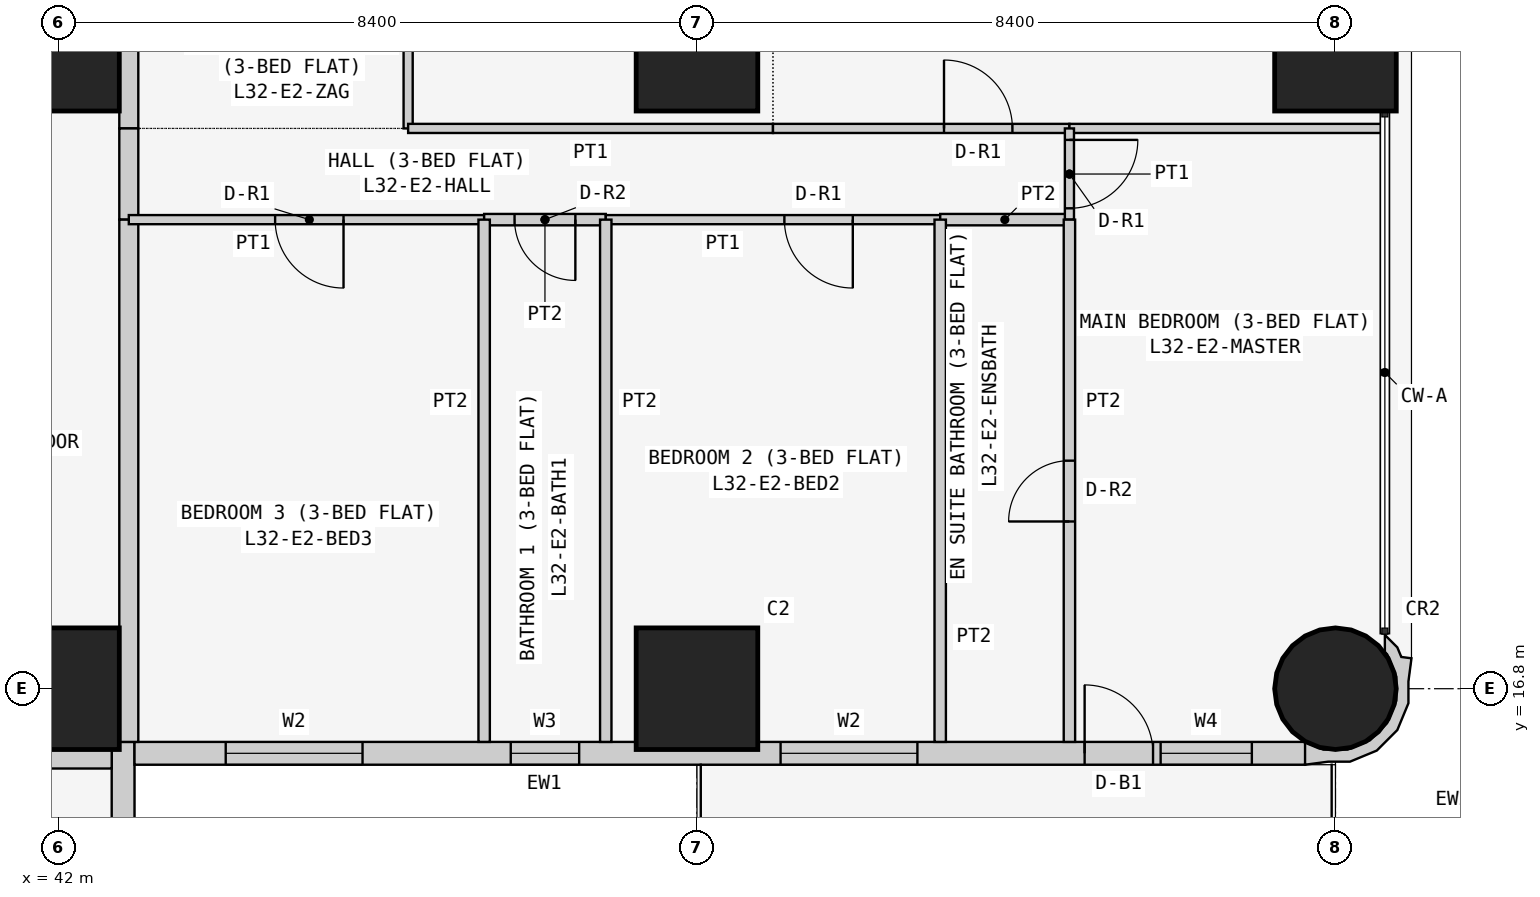
"""IFC4 building model, lengths in metres.
Left out: names, types, materials, properties, quantities, classifications, styles, units other than length and angle.
Written with IfcOpenShell. Run it as: python <this file> out.ifc"""

import sys

from ifc_helpers import new_model, si_unit, direction, frame, frame_2d, origin, origin_2d, place, context, subcontext, project, spatial, polyline, rectangle, circle, outline, extrude, element, fill, save


model = new_model("IFC4")
c1 = context("Model", 3, precision=1e-05, world=origin(), true_north=direction((0.0, 1.0)))
c2 = subcontext(c1, "Body", "Model", "MODEL_VIEW")
j1 = project(units=[si_unit("LENGTHUNIT", "METRE"), si_unit("PLANEANGLEUNIT", "RADIAN")], contexts=[c1])
p1 = place(None, origin())
s1 = spatial("IfcSite", under=j1, at=p1, CompositionType="ELEMENT")
p2 = place(p1, origin())
s2 = spatial("IfcBuilding", under=s1, at=p2, CompositionType="ELEMENT")
p3 = place(p2, frame((0.0, 0.0, 126.9)))
s3 = spatial("IfcBuildingStorey", under=s2, at=p3, CompositionType="ELEMENT", Elevation=126.9)
for number, where, z_axis, x_axis in (
    (1, (42.0, 16.8, 0.0), (0.0, 0.0, 1.0), (1.0, 0.0, 0.0)),
    (2, (42.0, 25.2, 0.0), (0.0, 0.0, 1.0), (1.0, 0.0, 0.0)),
    (3, (50.4, 16.8, 0.0), (0.0, 0.0, 1.0), (1.0, 0.0, 0.0)),
    (4, (50.4, 25.2, 0.0), (0.0, 0.0, 1.0), (1.0, 0.0, 0.0)),
):
    element("IfcColumn", number, at=place(p3, frame(where, z_axis=z_axis, x_axis=x_axis)), inside=s3, PredefinedType="COLUMN", context=c2, shape_type="SweptSolid", body=[
        extrude(rectangle(XDim=1.6, YDim=1.6, at=origin_2d()), origin(), (0.0, 0.0, 1.0), 3.6),
    ])
p4 = place(p3, frame((58.8, 16.8, 0.0), z_axis=(0.0, 0.0, 1.0), x_axis=(1.0, 0.0, 0.0)))
e5 = element("IfcColumn", 5, at=p4, inside=s3, PredefinedType="COLUMN", context=c2, shape_type="SweptSolid", body=[
    extrude(circle(Radius=0.8, at=origin_2d()), origin(), (0.0, 0.0, 1.0), 3.6),
])
p5 = place(p3, frame((58.8, 25.2, 0.0), z_axis=(0.0, 0.0, 1.0), x_axis=(1.0, 0.0, 0.0)))
e6 = element("IfcColumn", 6, at=p5, inside=s3, PredefinedType="COLUMN", context=c2, shape_type="SweptSolid", body=[
    extrude(rectangle(XDim=1.6, YDim=1.6, at=origin_2d()), origin(), (0.0, 0.0, 1.0), 3.6),
])
p6 = place(p3, frame((42.85, 8.8, 0.0), z_axis=(0.0, 0.0, 1.0), x_axis=(0.0, 1.0, 0.0)))
e7 = element("IfcWall", 7, at=p6, inside=s3, PredefinedType="SOLIDWALL", context=c2, shape_type="SweptSolid", body=[
    extrude(rectangle(XDim=7.3, YDim=0.3, at=frame_2d((3.65, 0.0))), origin(), (0.0, 0.0, 1.0), 3.45),
])
p7 = place(p6, frame((3.1, 0.0, 0.9)))
e8 = element("IfcOpeningElement", 8, at=p7, cuts=e7, PredefinedType="OPENING", context=c2, shape_type="SweptSolid", body=[
    extrude(rectangle(XDim=2.4, YDim=1.5, at=frame_2d((1.2, 0.75))), frame((0.0, 0.16, 0.0), z_axis=(0.0, -1.0, 0.0), x_axis=(1.0, 0.0, 0.0)), (0.0, 0.0, 1.0), 0.32),
])
p8 = place(p6, frame((0.75, 0.0, 0.9)))
e9 = element("IfcOpeningElement", 9, at=p8, cuts=e7, PredefinedType="OPENING", context=c2, shape_type="SweptSolid", body=[
    extrude(rectangle(XDim=1.2, YDim=1.5, at=frame_2d((0.6, 0.75))), frame((0.0, 0.16, 0.0), z_axis=(0.0, -1.0, 0.0), x_axis=(1.0, 0.0, 0.0)), (0.0, 0.0, 1.0), 0.32),
])
p9 = place(p3, frame((43.0, 15.95, 0.0), z_axis=(0.0, 0.0, 1.0), x_axis=(1.0, 0.0, 0.0)))
e10 = element("IfcWall", 10, at=p9, inside=s3, PredefinedType="SOLIDWALL", context=c2, shape_type="SweptSolid", body=[
    extrude(rectangle(XDim=15.4, YDim=0.3, at=frame_2d((7.7, 0.0))), origin(), (0.0, 0.0, 1.0), 3.45),
])
p10 = place(p9, frame((1.2, 0.0, 0.9)))
e11 = element("IfcOpeningElement", 11, at=p10, cuts=e10, PredefinedType="OPENING", context=c2, shape_type="SweptSolid", body=[
    extrude(rectangle(XDim=1.8, YDim=1.5, at=frame_2d((0.9, 0.75))), frame((0.0, 0.16, 0.0), z_axis=(0.0, -1.0, 0.0), x_axis=(1.0, 0.0, 0.0)), (0.0, 0.0, 1.0), 0.32),
])
p11 = place(p9, frame((4.95, 0.0, 1.5)))
e12 = element("IfcOpeningElement", 12, at=p11, cuts=e10, PredefinedType="OPENING", context=c2, shape_type="SweptSolid", body=[
    extrude(rectangle(XDim=0.9, YDim=0.7, at=frame_2d((0.45, 0.35))), frame((0.0, 0.16, 0.0), z_axis=(0.0, -1.0, 0.0), x_axis=(1.0, 0.0, 0.0)), (0.0, 0.0, 1.0), 0.32),
])
p12 = place(p9, frame((8.5, 0.0, 0.9)))
e13 = element("IfcOpeningElement", 13, at=p12, cuts=e10, PredefinedType="OPENING", context=c2, shape_type="SweptSolid", body=[
    extrude(rectangle(XDim=1.8, YDim=1.5, at=frame_2d((0.9, 0.75))), frame((0.0, 0.16, 0.0), z_axis=(0.0, -1.0, 0.0), x_axis=(1.0, 0.0, 0.0)), (0.0, 0.0, 1.0), 0.32),
])
p13 = place(p9, frame((12.5, 0.0, 0.0)))
e14 = element("IfcOpeningElement", 14, at=p13, cuts=e10, PredefinedType="OPENING", context=c2, shape_type="SweptSolid", body=[
    extrude(rectangle(XDim=0.9, YDim=2.4, at=frame_2d((0.45, 1.2))), frame((0.0, 0.16, 0.0), z_axis=(0.0, -1.0, 0.0), x_axis=(1.0, 0.0, 0.0)), (0.0, 0.0, 1.0), 0.32),
])
p14 = place(p9, frame((13.5, 0.0, 0.9)))
e15 = element("IfcOpeningElement", 15, at=p14, cuts=e10, PredefinedType="OPENING", context=c2, shape_type="SweptSolid", body=[
    extrude(rectangle(XDim=1.2, YDim=1.5, at=frame_2d((0.6, 0.75))), frame((0.0, 0.16, 0.0), z_axis=(0.0, -1.0, 0.0), x_axis=(1.0, 0.0, 0.0)), (0.0, 0.0, 1.0), 0.32),
])
p15 = place(p3, frame((58.473, 15.983, 0.0), z_axis=(0.0, 0.0, 1.0), x_axis=(0.93923434088, -0.343276641956, 0.0)))
e16 = element("IfcWall", 16, at=p15, inside=s3, PredefinedType="SOLIDWALL", context=c2, shape_type="SweptSolid", body=[
    extrude(outline(polyline([(0.828, 1.599), (0.697, 1.569), (0.604, 1.67), (0.394, 1.767), (0.471, 1.556), (0.508, 1.539), (0.724, 1.304), (0.834, 1.005), (0.82, 0.686), (0.686, 0.397), (0.451, 0.182), (0.152, 0.073), (-0.116, 0.084), (-0.127, 0.078), (-0.146, 0.071), (-0.006, -0.197), (0.266, -0.055), (0.535, 0.044), (0.817, 0.302), (0.978, 0.648), (0.994, 1.03), (0.895, 1.3), (0.828, 1.599)])), origin(), (0.0, 0.0, 1.0), 3.45),
])
p16 = place(p3, frame((42.925, 29.4, 0.0), z_axis=(0.0, 0.0, 1.0), x_axis=(0.0, -1.0, 0.0)))
e17 = element("IfcWall", 17, at=p16, inside=s3, PredefinedType="PARTITIONING", context=c2, shape_type="SweptSolid", body=[
    extrude(rectangle(XDim=5.229, YDim=0.25, at=frame_2d((2.615, 0.0))), origin(), (0.0, 0.0, 1.0), 3.45),
])
p17 = place(p16, frame((2.1, 0.0, 0.0)))
e18 = element("IfcOpeningElement", 18, at=p17, cuts=e17, PredefinedType="OPENING", context=c2, shape_type="SweptSolid", body=[
    extrude(rectangle(XDim=1.0, YDim=2.1, at=frame_2d((0.5, 1.05))), frame((0.0, 0.135, 0.0), z_axis=(0.0, -1.0, 0.0), x_axis=(1.0, 0.0, 0.0)), (0.0, 0.0, 1.0), 0.27),
])
p18 = place(p3, frame((42.925, 24.171, 0.0), z_axis=(0.0, 0.0, 1.0), x_axis=(0.0, -1.0, 0.0)))
e19 = element("IfcWall", 19, at=p18, inside=s3, PredefinedType="PARTITIONING", context=c2, shape_type="SweptSolid", body=[
    extrude(rectangle(XDim=1.2, YDim=0.25, at=frame_2d((0.6, 0.0))), origin(), (0.0, 0.0, 1.0), 3.45),
])
for number, where, z_axis, x_axis in (
    (20, (42.925, 22.971, 0.0), (0.0, 0.0, 1.0), (0.0, -1.0, 0.0)),
    (21, (42.7, 15.875, 0.0), (0.0, 0.0, 1.0), (-1.0, 0.0, 0.0)),
):
    element("IfcWall", number, at=place(p3, frame(where, z_axis=z_axis, x_axis=x_axis)), inside=s3, PredefinedType="PARTITIONING", context=c2, shape_type="SweptSolid", body=[
        extrude(rectangle(XDim=6.871, YDim=0.25, at=frame_2d((3.436, 0.0))), origin(), (0.0, 0.0, 1.0), 3.45),
    ])
p19 = place(p3, frame((46.6, 29.4, 0.0), z_axis=(0.0, 0.0, 1.0), x_axis=(0.0, -1.0, 0.0)))
e22 = element("IfcWall", 22, at=p19, inside=s3, PredefinedType="PARTITIONING", context=c2, shape_type="SweptSolid", body=[
    extrude(rectangle(XDim=5.229, YDim=0.12, at=frame_2d((2.615, 0.0))), origin(), (0.0, 0.0, 1.0), 3.45),
])
p20 = place(p19, frame((1.05, 0.0, 0.0)))
e23 = element("IfcOpeningElement", 23, at=p20, cuts=e22, PredefinedType="OPENING", context=c2, shape_type="SweptSolid", body=[
    extrude(rectangle(XDim=0.9, YDim=2.1, at=frame_2d((0.45, 1.05))), frame((0.0, 0.07, 0.0), z_axis=(0.0, -1.0, 0.0), x_axis=(1.0, 0.0, 0.0)), (0.0, 0.0, 1.0), 0.14),
])
p21 = place(p3, frame((51.4, 24.171, 0.0), z_axis=(0.0, 0.0, 1.0), x_axis=(-1.0, 0.0, 0.0)))
e24 = element("IfcWall", 24, at=p21, inside=s3, PredefinedType="PARTITIONING", context=c2, shape_type="SweptSolid", body=[
    extrude(rectangle(XDim=4.8, YDim=0.12, at=frame_2d((2.4, 0.0))), origin(), (0.0, 0.0, 1.0), 3.45),
])
p22 = place(p3, frame((55.3, 24.171, 0.0), z_axis=(0.0, 0.0, 1.0), x_axis=(-1.0, 0.0, 0.0)))
e25 = element("IfcWall", 25, at=p22, inside=s3, PredefinedType="PARTITIONING", context=c2, shape_type="SweptSolid", body=[
    extrude(rectangle(XDim=3.9, YDim=0.12, at=frame_2d((1.95, 0.0))), origin(), (0.0, 0.0, 1.0), 3.45),
])
p23 = place(p22, frame((0.75, 0.0, 0.0)))
e26 = element("IfcOpeningElement", 26, at=p23, cuts=e25, PredefinedType="OPENING", context=c2, shape_type="SweptSolid", body=[
    extrude(rectangle(XDim=0.9, YDim=2.1, at=frame_2d((0.45, 1.05))), frame((0.0, 0.07, 0.0), z_axis=(0.0, -1.0, 0.0), x_axis=(1.0, 0.0, 0.0)), (0.0, 0.0, 1.0), 0.14),
])
p24 = place(p3, frame((59.45, 24.171, 0.0), z_axis=(0.0, 0.0, 1.0), x_axis=(-1.0, 0.0, 0.0)))
e27 = element("IfcWall", 27, at=p24, inside=s3, PredefinedType="PARTITIONING", context=c2, shape_type="SweptSolid", body=[
    extrude(rectangle(XDim=4.15, YDim=0.12, at=frame_2d((2.075, 0.0))), origin(), (0.0, 0.0, 1.0), 3.45),
])
p25 = place(p3, frame((47.6, 22.971, 0.0), z_axis=(0.0, 0.0, 1.0), x_axis=(-1.0, 0.0, 0.0)))
e28 = element("IfcWall", 28, at=p25, inside=s3, PredefinedType="PARTITIONING", context=c2, shape_type="SweptSolid", body=[
    extrude(rectangle(XDim=4.675, YDim=0.12, at=frame_2d((2.337, 0.0))), origin(), (0.0, 0.0, 1.0), 3.45),
])
p26 = place(p25, frame((1.85, 0.0, 0.0)))
e29 = element("IfcOpeningElement", 29, at=p26, cuts=e28, PredefinedType="OPENING", context=c2, shape_type="SweptSolid", body=[
    extrude(rectangle(XDim=0.9, YDim=2.1, at=frame_2d((0.45, 1.05))), frame((0.0, 0.07, 0.0), z_axis=(0.0, -1.0, 0.0), x_axis=(1.0, 0.0, 0.0)), (0.0, 0.0, 1.0), 0.14),
])
p27 = place(p3, frame((49.2, 22.971, 0.0), z_axis=(0.0, 0.0, 1.0), x_axis=(-1.0, 0.0, 0.0)))
e30 = element("IfcWall", 30, at=p27, inside=s3, PredefinedType="PARTITIONING", context=c2, shape_type="SweptSolid", body=[
    extrude(rectangle(XDim=1.6, YDim=0.15, at=frame_2d((0.8, 0.0))), origin(), (0.0, 0.0, 1.0), 3.45),
])
p28 = place(p27, frame((0.4, 0.0, 0.0)))
e31 = element("IfcOpeningElement", 31, at=p28, cuts=e30, PredefinedType="OPENING", context=c2, shape_type="SweptSolid", body=[
    extrude(rectangle(XDim=0.8, YDim=2.1, at=frame_2d((0.4, 1.05))), frame((0.0, 0.085, 0.0), z_axis=(0.0, -1.0, 0.0), x_axis=(1.0, 0.0, 0.0)), (0.0, 0.0, 1.0), 0.17),
])
p29 = place(p3, frame((53.6, 22.971, 0.0), z_axis=(0.0, 0.0, 1.0), x_axis=(-1.0, 0.0, 0.0)))
e32 = element("IfcWall", 32, at=p29, inside=s3, PredefinedType="PARTITIONING", context=c2, shape_type="SweptSolid", body=[
    extrude(rectangle(XDim=4.4, YDim=0.12, at=frame_2d((2.2, 0.0))), origin(), (0.0, 0.0, 1.0), 3.45),
])
p30 = place(p29, frame((1.15, 0.0, 0.0)))
e33 = element("IfcOpeningElement", 33, at=p30, cuts=e32, PredefinedType="OPENING", context=c2, shape_type="SweptSolid", body=[
    extrude(rectangle(XDim=0.9, YDim=2.1, at=frame_2d((0.45, 1.05))), frame((0.0, 0.07, 0.0), z_axis=(0.0, -1.0, 0.0), x_axis=(1.0, 0.0, 0.0)), (0.0, 0.0, 1.0), 0.14),
])
p31 = place(p3, frame((55.3, 22.971, 0.0), z_axis=(0.0, 0.0, 1.0), x_axis=(-1.0, 0.0, 0.0)))
e34 = element("IfcWall", 34, at=p31, inside=s3, PredefinedType="PARTITIONING", context=c2, shape_type="SweptSolid", body=[
    extrude(rectangle(XDim=1.7, YDim=0.15, at=frame_2d((0.85, 0.0))), origin(), (0.0, 0.0, 1.0), 3.45),
])
p32 = place(p3, frame((55.3, 24.171, 0.0), z_axis=(0.0, 0.0, 1.0), x_axis=(0.0, -1.0, 0.0)))
e35 = element("IfcWall", 35, at=p32, inside=s3, PredefinedType="PARTITIONING", context=c2, shape_type="SweptSolid", body=[
    extrude(rectangle(XDim=1.2, YDim=0.12, at=frame_2d((0.6, 0.0))), origin(), (0.0, 0.0, 1.0), 3.45),
])
p33 = place(p32, frame((0.151, 0.0, 0.0)))
e36 = element("IfcOpeningElement", 36, at=p33, cuts=e35, PredefinedType="OPENING", context=c2, shape_type="SweptSolid", body=[
    extrude(rectangle(XDim=0.9, YDim=2.1, at=frame_2d((0.45, 1.05))), frame((0.0, 0.07, 0.0), z_axis=(0.0, -1.0, 0.0), x_axis=(1.0, 0.0, 0.0)), (0.0, 0.0, 1.0), 0.14),
])
for number, where, z_axis, x_axis in (
    (37, (47.6, 22.971, 0.0), (0.0, 0.0, 1.0), (0.0, -1.0, 0.0)),
    (38, (49.2, 22.971, 0.0), (0.0, 0.0, 1.0), (0.0, -1.0, 0.0)),
    (39, (53.6, 22.971, 0.0), (0.0, 0.0, 1.0), (0.0, -1.0, 0.0)),
):
    element("IfcWall", number, at=place(p3, frame(where, z_axis=z_axis, x_axis=x_axis)), inside=s3, PredefinedType="PARTITIONING", context=c2, shape_type="SweptSolid", body=[
        extrude(rectangle(XDim=6.871, YDim=0.15, at=frame_2d((3.436, 0.0))), origin(), (0.0, 0.0, 1.0), 3.45),
    ])
p34 = place(p3, frame((55.3, 22.971, 0.0), z_axis=(0.0, 0.0, 1.0), x_axis=(0.0, -1.0, 0.0)))
e40 = element("IfcWall", 40, at=p34, inside=s3, PredefinedType="PARTITIONING", context=c2, shape_type="SweptSolid", body=[
    extrude(rectangle(XDim=6.871, YDim=0.15, at=frame_2d((3.436, 0.0))), origin(), (0.0, 0.0, 1.0), 3.45),
])
p35 = place(p34, frame((3.171, 0.0, 0.0)))
e41 = element("IfcOpeningElement", 41, at=p35, cuts=e40, PredefinedType="OPENING", context=c2, shape_type="SweptSolid", body=[
    extrude(rectangle(XDim=0.8, YDim=2.1, at=frame_2d((0.4, 1.05))), frame((0.0, 0.085, 0.0), z_axis=(0.0, -1.0, 0.0), x_axis=(1.0, 0.0, 0.0)), (0.0, 0.0, 1.0), 0.17),
])
p36 = place(p10, origin())
e42 = element("IfcWindow", 42, at=p36, inside=s3, PartitioningType="SINGLE_PANEL", PredefinedType="WINDOW", context=c2, shape_type="SweptSolid", body=[
    extrude(rectangle(XDim=1.8, YDim=1.5, at=frame_2d((0.9, 0.75))), frame((0.0, 0.03, 0.0), z_axis=(0.0, -1.0, 0.0), x_axis=(1.0, 0.0, 0.0)), (0.0, 0.0, 1.0), 0.06),
])
fill(e11, e42)
p37 = place(p11, origin())
e43 = element("IfcWindow", 43, at=p37, inside=s3, PartitioningType="SINGLE_PANEL", PredefinedType="WINDOW", context=c2, shape_type="SweptSolid", body=[
    extrude(rectangle(XDim=0.9, YDim=0.7, at=frame_2d((0.45, 0.35))), frame((0.0, 0.03, 0.0), z_axis=(0.0, -1.0, 0.0), x_axis=(1.0, 0.0, 0.0)), (0.0, 0.0, 1.0), 0.06),
])
fill(e12, e43)
p38 = place(p12, origin())
e44 = element("IfcWindow", 44, at=p38, inside=s3, PartitioningType="SINGLE_PANEL", PredefinedType="WINDOW", context=c2, shape_type="SweptSolid", body=[
    extrude(rectangle(XDim=1.8, YDim=1.5, at=frame_2d((0.9, 0.75))), frame((0.0, 0.03, 0.0), z_axis=(0.0, -1.0, 0.0), x_axis=(1.0, 0.0, 0.0)), (0.0, 0.0, 1.0), 0.06),
])
fill(e13, e44)
p39 = place(p13, origin())
e45 = element("IfcDoor", 45, at=p39, inside=s3, OperationType="SINGLE_SWING_LEFT", PredefinedType="DOOR", context=c2, shape_type="SweptSolid", body=[
    extrude(rectangle(XDim=0.9, YDim=2.4, at=frame_2d((0.45, 1.2))), frame((0.0, 0.025, 0.0), z_axis=(0.0, -1.0, 0.0), x_axis=(1.0, 0.0, 0.0)), (0.0, 0.0, 1.0), 0.05),
])
fill(e14, e45)
p40 = place(p14, origin())
e46 = element("IfcWindow", 46, at=p40, inside=s3, PartitioningType="SINGLE_PANEL", PredefinedType="WINDOW", context=c2, shape_type="SweptSolid", body=[
    extrude(rectangle(XDim=1.2, YDim=1.5, at=frame_2d((0.6, 0.75))), frame((0.0, 0.03, 0.0), z_axis=(0.0, -1.0, 0.0), x_axis=(1.0, 0.0, 0.0)), (0.0, 0.0, 1.0), 0.06),
])
fill(e15, e46)
p41 = place(p23, frame((0.9, 0.0, 0.0), z_axis=(0.0, 0.0, 1.0), x_axis=(-1.0, 0.0, 0.0)))
e47 = element("IfcDoor", 47, at=p41, inside=s3, OperationType="SINGLE_SWING_LEFT", PredefinedType="DOOR", context=c2, shape_type="SweptSolid", body=[
    extrude(rectangle(XDim=0.9, YDim=2.1, at=frame_2d((0.45, 1.05))), frame((0.0, 0.025, 0.0), z_axis=(0.0, -1.0, 0.0), x_axis=(1.0, 0.0, 0.0)), (0.0, 0.0, 1.0), 0.05),
])
fill(e26, e47)
p42 = place(p26, origin())
e48 = element("IfcDoor", 48, at=p42, inside=s3, OperationType="SINGLE_SWING_LEFT", PredefinedType="DOOR", context=c2, shape_type="SweptSolid", body=[
    extrude(rectangle(XDim=0.9, YDim=2.1, at=frame_2d((0.45, 1.05))), frame((0.0, 0.025, 0.0), z_axis=(0.0, -1.0, 0.0), x_axis=(1.0, 0.0, 0.0)), (0.0, 0.0, 1.0), 0.05),
])
fill(e29, e48)
p43 = place(p28, origin())
e49 = element("IfcDoor", 49, at=p43, inside=s3, OperationType="SINGLE_SWING_LEFT", PredefinedType="DOOR", context=c2, shape_type="SweptSolid", body=[
    extrude(rectangle(XDim=0.8, YDim=2.1, at=frame_2d((0.4, 1.05))), frame((0.0, 0.025, 0.0), z_axis=(0.0, -1.0, 0.0), x_axis=(1.0, 0.0, 0.0)), (0.0, 0.0, 1.0), 0.05),
])
fill(e31, e49)
p44 = place(p30, origin())
e50 = element("IfcDoor", 50, at=p44, inside=s3, OperationType="SINGLE_SWING_LEFT", PredefinedType="DOOR", context=c2, shape_type="SweptSolid", body=[
    extrude(rectangle(XDim=0.9, YDim=2.1, at=frame_2d((0.45, 1.05))), frame((0.0, 0.025, 0.0), z_axis=(0.0, -1.0, 0.0), x_axis=(1.0, 0.0, 0.0)), (0.0, 0.0, 1.0), 0.05),
])
fill(e33, e50)
p45 = place(p33, origin())
e51 = element("IfcDoor", 51, at=p45, inside=s3, OperationType="SINGLE_SWING_LEFT", PredefinedType="DOOR", context=c2, shape_type="SweptSolid", body=[
    extrude(rectangle(XDim=0.9, YDim=2.1, at=frame_2d((0.45, 1.05))), frame((0.0, 0.025, 0.0), z_axis=(0.0, -1.0, 0.0), x_axis=(1.0, 0.0, 0.0)), (0.0, 0.0, 1.0), 0.05),
])
fill(e36, e51)
p46 = place(p35, frame((0.8, 0.0, 0.0), z_axis=(0.0, 0.0, 1.0), x_axis=(-1.0, 0.0, 0.0)))
e52 = element("IfcDoor", 52, at=p46, inside=s3, OperationType="SINGLE_SWING_LEFT", PredefinedType="DOOR", context=c2, shape_type="SweptSolid", body=[
    extrude(rectangle(XDim=0.8, YDim=2.1, at=frame_2d((0.4, 1.05))), frame((0.0, 0.025, 0.0), z_axis=(0.0, -1.0, 0.0), x_axis=(1.0, 0.0, 0.0)), (0.0, 0.0, 1.0), 0.05),
])
fill(e41, e52)
save(model, sys.argv[1])
